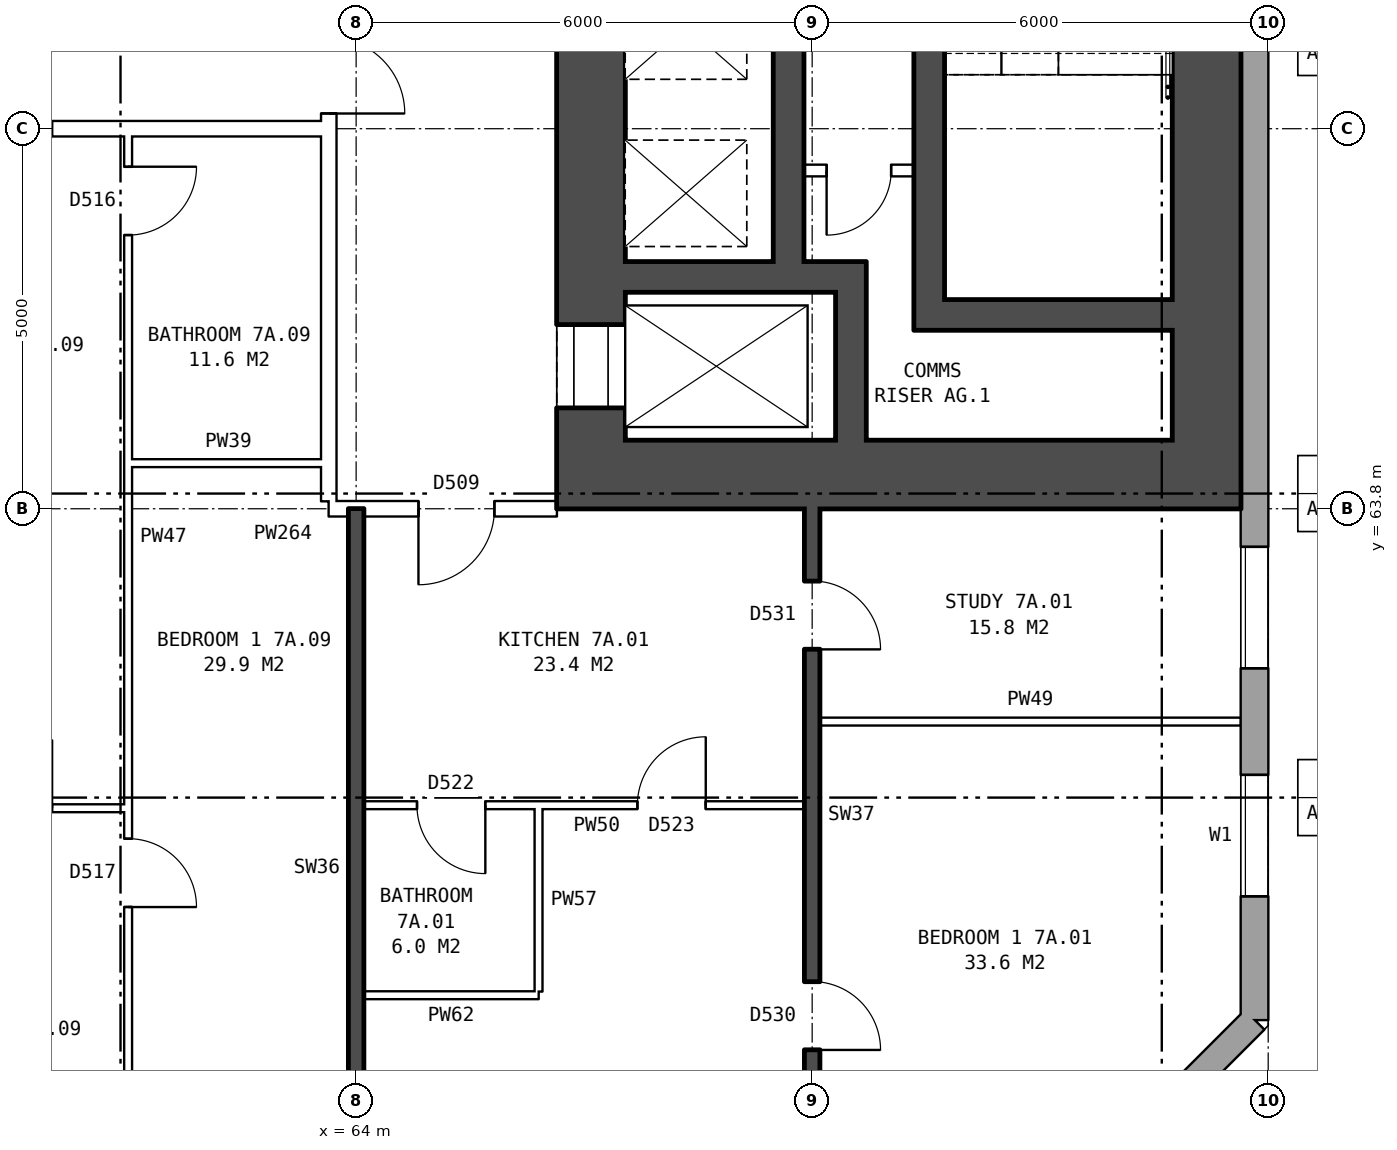
"""IFC4 building model, lengths in metres.
Left out: names, types, materials, properties, quantities, classifications, styles, units other than length and angle.
Written with IfcOpenShell. Run it as: python <this file> out.ifc"""

import sys

from ifc_helpers import new_model, si_unit, direction, frame, frame_2d, origin, place, context, subcontext, project, spatial, rectangle, extrude, element, fill, save


model = new_model("IFC4")
c1 = context("Model", 3, precision=1e-05, world=origin(), true_north=direction((0.0, 1.0)))
c2 = subcontext(c1, "Body", "Model", "MODEL_VIEW")
j1 = project(units=[si_unit("LENGTHUNIT", "METRE"), si_unit("PLANEANGLEUNIT", "RADIAN")], contexts=[c1])
p1 = place(None, origin())
s1 = spatial("IfcSite", under=j1, at=p1, CompositionType="ELEMENT")
p2 = place(p1, origin())
s2 = spatial("IfcBuilding", under=s1, at=p2, CompositionType="ELEMENT")
p3 = place(p2, frame((0.0, 0.0, 28.8)))
s3 = spatial("IfcBuildingStorey", under=s2, at=p3, CompositionType="ELEMENT", Elevation=28.8)
p4 = place(p3, frame((72.925, 54.18, 0.0), z_axis=(0.0, 0.0, 1.0), x_axis=(0.707106781187, 0.707106781187, 0.0)))
e1 = element("IfcWall", 1, at=p4, inside=s3, PredefinedType="STANDARD", context=c2, shape_type="SweptSolid", body=[
    extrude(rectangle(XDim=4.094, YDim=0.36, at=frame_2d((2.047, 0.0))), origin(), (0.0, 0.0, 1.0), 2.85),
])
p5 = place(p4, frame((1.247, 0.0, 0.8)))
e2 = element("IfcOpeningElement", 2, at=p5, cuts=e1, PredefinedType="OPENING", context=c2, shape_type="SweptSolid", body=[
    extrude(rectangle(XDim=1.6, YDim=1.8, at=frame_2d((0.8, 0.9))), frame((0.0, 0.19, 0.0), z_axis=(0.0, -1.0, 0.0), x_axis=(1.0, 0.0, 0.0)), (0.0, 0.0, 1.0), 0.38),
])
p6 = place(p3, frame((75.82, 57.075, 0.0), z_axis=(0.0, 0.0, 1.0), x_axis=(0.0, 1.0, 0.0)))
e3 = element("IfcWall", 3, at=p6, inside=s3, PredefinedType="STANDARD", context=c2, shape_type="SweptSolid", body=[
    extrude(rectangle(XDim=25.851, YDim=0.36, at=frame_2d((12.925, 0.0))), origin(), (0.0, 0.0, 1.0), 2.85),
])
p7 = place(p6, frame((1.625, 0.0, 0.8)))
e4 = element("IfcOpeningElement", 4, at=p7, cuts=e3, PredefinedType="OPENING", context=c2, shape_type="SweptSolid", body=[
    extrude(rectangle(XDim=1.6, YDim=1.8, at=frame_2d((0.8, 0.9))), frame((0.0, 0.19, 0.0), z_axis=(0.0, -1.0, 0.0), x_axis=(1.0, 0.0, 0.0)), (0.0, 0.0, 1.0), 0.38),
])
p8 = place(p6, frame((4.625, 0.0, 0.8)))
e5 = element("IfcOpeningElement", 5, at=p8, cuts=e3, PredefinedType="OPENING", context=c2, shape_type="SweptSolid", body=[
    extrude(rectangle(XDim=1.6, YDim=1.8, at=frame_2d((0.8, 0.9))), frame((0.0, 0.19, 0.0), z_axis=(0.0, -1.0, 0.0), x_axis=(1.0, 0.0, 0.0)), (0.0, 0.0, 1.0), 0.38),
])
p9 = place(p6, frame((19.625, 0.0, 0.8)))
e6 = element("IfcOpeningElement", 6, at=p9, cuts=e3, PredefinedType="OPENING", context=c2, shape_type="SweptSolid", body=[
    extrude(rectangle(XDim=1.6, YDim=1.8, at=frame_2d((0.8, 0.9))), frame((0.0, 0.19, 0.0), z_axis=(0.0, -1.0, 0.0), x_axis=(1.0, 0.0, 0.0)), (0.0, 0.0, 1.0), 0.38),
])
p10 = place(p6, frame((22.625, 0.0, 0.8)))
e7 = element("IfcOpeningElement", 7, at=p10, cuts=e3, PredefinedType="OPENING", context=c2, shape_type="SweptSolid", body=[
    extrude(rectangle(XDim=1.6, YDim=1.8, at=frame_2d((0.8, 0.9))), frame((0.0, 0.19, 0.0), z_axis=(0.0, -1.0, 0.0), x_axis=(1.0, 0.0, 0.0)), (0.0, 0.0, 1.0), 0.38),
])
p11 = place(p3, frame((67.09, 64.7, 0.0), z_axis=(0.0, 0.0, 1.0), x_axis=(0.0, 1.0, 0.0)))
e8 = element("IfcWall", 8, at=p11, inside=s3, PredefinedType="SHEAR", context=c2, shape_type="SweptSolid", body=[
    extrude(rectangle(XDim=10.6, YDim=0.9, at=frame_2d((5.3, 0.0))), origin(), (0.0, 0.0, 1.0), 2.85),
])
p12 = place(p11, frame((0.425, 0.0, 0.0)))
e9 = element("IfcOpeningElement", 9, at=p12, cuts=e8, PredefinedType="OPENING", context=c2, shape_type="SweptSolid", body=[
    extrude(rectangle(XDim=1.1, YDim=2.1, at=frame_2d((0.55, 1.05))), frame((0.0, 0.46, 0.0), z_axis=(0.0, -1.0, 0.0), x_axis=(1.0, 0.0, 0.0)), (0.0, 0.0, 1.0), 0.92),
])
p13 = place(p11, frame((9.0, 0.0, 0.0)))
e10 = element("IfcOpeningElement", 10, at=p13, cuts=e8, PredefinedType="OPENING", context=c2, shape_type="SweptSolid", body=[
    extrude(rectangle(XDim=1.1, YDim=2.1, at=frame_2d((0.55, 1.05))), frame((0.0, 0.46, 0.0), z_axis=(0.0, -1.0, 0.0), x_axis=(1.0, 0.0, 0.0)), (0.0, 0.0, 1.0), 0.92),
])
p14 = place(p3, frame((75.19, 64.7, 0.0), z_axis=(0.0, 0.0, 1.0), x_axis=(0.0, 1.0, 0.0)))
e11 = element("IfcWall", 11, at=p14, inside=s3, PredefinedType="SHEAR", context=c2, shape_type="SweptSolid", body=[
    extrude(rectangle(XDim=10.6, YDim=0.9, at=frame_2d((5.3, 0.0))), origin(), (0.0, 0.0, 1.0), 2.85),
])
p15 = place(p3, frame((66.64, 64.25, 0.0), z_axis=(0.0, 0.0, 1.0), x_axis=(1.0, 0.0, 0.0)))
e12 = element("IfcWall", 12, at=p15, inside=s3, PredefinedType="SHEAR", context=c2, shape_type="SweptSolid", body=[
    extrude(rectangle(XDim=9.0, YDim=0.9, at=frame_2d((4.5, 0.0))), origin(), (0.0, 0.0, 1.0), 2.85),
])
p16 = place(p3, frame((71.74, 66.35, 0.0), z_axis=(0.0, 0.0, 1.0), x_axis=(1.0, 0.0, 0.0)))
e13 = element("IfcWall", 13, at=p16, inside=s3, PredefinedType="SHEAR", context=c2, shape_type="SweptSolid", body=[
    extrude(rectangle(XDim=3.0, YDim=0.4, at=frame_2d((1.5, 0.0))), origin(), (0.0, 0.0, 1.0), 2.85),
])
p17 = place(p3, frame((67.54, 66.85, 0.0), z_axis=(0.0, 0.0, 1.0), x_axis=(1.0, 0.0, 0.0)))
e14 = element("IfcWall", 14, at=p17, inside=s3, PredefinedType="SHEAR", context=c2, shape_type="SweptSolid", body=[
    extrude(rectangle(XDim=3.17, YDim=0.4, at=frame_2d((1.585, 0.0))), origin(), (0.0, 0.0, 1.0), 2.85),
])
p18 = place(p3, frame((69.89, 68.25, 0.0), z_axis=(0.0, 0.0, 1.0), x_axis=(1.0, 0.0, 0.0)))
e15 = element("IfcWall", 15, at=p18, inside=s3, PredefinedType="PARTITIONING", context=c2, shape_type="SweptSolid", body=[
    extrude(rectangle(XDim=1.45, YDim=0.15, at=frame_2d((0.725, 0.0))), origin(), (0.0, 0.0, 1.0), 2.85),
])
p19 = place(p18, frame((0.3, 0.0, 0.0)))
e16 = element("IfcOpeningElement", 16, at=p19, cuts=e15, PredefinedType="OPENING", context=c2, shape_type="SweptSolid", body=[
    extrude(rectangle(XDim=0.85, YDim=2.1, at=frame_2d((0.425, 1.05))), frame((0.0, 0.085, 0.0), z_axis=(0.0, -1.0, 0.0), x_axis=(1.0, 0.0, 0.0)), (0.0, 0.0, 1.0), 0.17),
])
p20 = place(p3, frame((69.69, 67.05, 0.0), z_axis=(0.0, 0.0, 1.0), x_axis=(0.0, 1.0, 0.0)))
e17 = element("IfcWall", 17, at=p20, inside=s3, PredefinedType="SHEAR", context=c2, shape_type="SweptSolid", body=[
    extrude(rectangle(XDim=6.6, YDim=0.4, at=frame_2d((3.3, 0.0))), origin(), (0.0, 0.0, 1.0), 2.85),
])
p21 = place(p3, frame((70.51, 64.7, 0.0), z_axis=(0.0, 0.0, 1.0), x_axis=(0.0, 1.0, 0.0)))
e18 = element("IfcWall", 18, at=p21, inside=s3, PredefinedType="SHEAR", context=c2, shape_type="SweptSolid", body=[
    extrude(rectangle(XDim=1.95, YDim=0.4, at=frame_2d((0.975, 0.0))), origin(), (0.0, 0.0, 1.0), 2.85),
])
p22 = place(p3, frame((71.54, 66.15, 0.0), z_axis=(0.0, 0.0, 1.0), x_axis=(0.0, 1.0, 0.0)))
e19 = element("IfcWall", 19, at=p22, inside=s3, PredefinedType="SHEAR", context=c2, shape_type="SweptSolid", body=[
    extrude(rectangle(XDim=7.3, YDim=0.4, at=frame_2d((3.65, 0.0))), origin(), (0.0, 0.0, 1.0), 2.85),
])
p23 = place(p22, frame((5.8, 0.0, 0.0)))
e20 = element("IfcOpeningElement", 20, at=p23, cuts=e19, PredefinedType="OPENING", context=c2, shape_type="SweptSolid", body=[
    extrude(rectangle(XDim=1.1, YDim=2.1, at=frame_2d((0.55, 1.05))), frame((0.0, 0.21, 0.0), z_axis=(0.0, -1.0, 0.0), x_axis=(1.0, 0.0, 0.0)), (0.0, 0.0, 1.0), 0.42),
])
p24 = place(p3, frame((63.64, 63.9, 0.0), z_axis=(0.0, 0.0, 1.0), x_axis=(0.0, 1.0, 0.0)))
e21 = element("IfcWall", 21, at=p24, inside=s3, PredefinedType="PARTITIONING", context=c2, shape_type="SweptSolid", body=[
    extrude(rectangle(XDim=12.2, YDim=0.2, at=frame_2d((6.1, 0.0))), origin(), (0.0, 0.0, 1.0), 2.85),
])
p25 = place(p24, frame((5.1, 0.0, 0.0)))
e22 = element("IfcOpeningElement", 22, at=p25, cuts=e21, PredefinedType="OPENING", context=c2, shape_type="SweptSolid", body=[
    extrude(rectangle(XDim=2.0, YDim=2.1, at=frame_2d((1.0, 1.05))), frame((0.0, 0.11, 0.0), z_axis=(0.0, -1.0, 0.0), x_axis=(1.0, 0.0, 0.0)), (0.0, 0.0, 1.0), 0.22),
])
p26 = place(p3, frame((64.1, 57.4, 0.0), z_axis=(0.0, 0.0, 1.0), x_axis=(1.0, 0.0, 0.0)))
e23 = element("IfcWall", 23, at=p26, inside=s3, PredefinedType="PARTITIONING", context=c2, shape_type="SweptSolid", body=[
    extrude(rectangle(XDim=2.3, YDim=0.1, at=frame_2d((1.15, 0.0))), origin(), (0.0, 0.0, 1.0), 2.85),
])
p27 = place(p3, frame((58.1, 59.86, 0.0), z_axis=(0.0, 0.0, 1.0), x_axis=(1.0, 0.0, 0.0)))
e24 = element("IfcWall", 24, at=p27, inside=s3, PredefinedType="PARTITIONING", context=c2, shape_type="SweptSolid", body=[
    extrude(rectangle(XDim=2.9, YDim=0.1, at=frame_2d((1.45, 0.0))), origin(), (0.0, 0.0, 1.0), 2.85),
])
p28 = place(p27, frame((1.0, 0.0, 0.0)))
e25 = element("IfcOpeningElement", 25, at=p28, cuts=e24, PredefinedType="OPENING", context=c2, shape_type="SweptSolid", body=[
    extrude(rectangle(XDim=0.9, YDim=2.1, at=frame_2d((0.45, 1.05))), frame((0.0, 0.06, 0.0), z_axis=(0.0, -1.0, 0.0), x_axis=(1.0, 0.0, 0.0)), (0.0, 0.0, 1.0), 0.12),
])
p29 = place(p3, frame((64.1, 59.9, 0.0), z_axis=(0.0, 0.0, 1.0), x_axis=(1.0, 0.0, 0.0)))
e26 = element("IfcWall", 26, at=p29, inside=s3, PredefinedType="PARTITIONING", context=c2, shape_type="SweptSolid", body=[
    extrude(rectangle(XDim=5.8, YDim=0.1, at=frame_2d((2.9, 0.0))), origin(), (0.0, 0.0, 1.0), 2.85),
])
p30 = place(p29, frame((3.6, 0.0, 0.0)))
e27 = element("IfcOpeningElement", 27, at=p30, cuts=e26, PredefinedType="OPENING", context=c2, shape_type="SweptSolid", body=[
    extrude(rectangle(XDim=0.9, YDim=2.1, at=frame_2d((0.45, 1.05))), frame((0.0, 0.06, 0.0), z_axis=(0.0, -1.0, 0.0), x_axis=(1.0, 0.0, 0.0)), (0.0, 0.0, 1.0), 0.12),
])
p31 = place(p29, frame((0.7, 0.0, 0.0)))
e28 = element("IfcOpeningElement", 28, at=p31, cuts=e26, PredefinedType="OPENING", context=c2, shape_type="SweptSolid", body=[
    extrude(rectangle(XDim=0.9, YDim=2.1, at=frame_2d((0.45, 1.05))), frame((0.0, 0.06, 0.0), z_axis=(0.0, -1.0, 0.0), x_axis=(1.0, 0.0, 0.0)), (0.0, 0.0, 1.0), 0.12),
])
p32 = place(p3, frame((70.1, 61.0, 0.0), z_axis=(0.0, 0.0, 1.0), x_axis=(1.0, 0.0, 0.0)))
e29 = element("IfcWall", 29, at=p32, inside=s3, PredefinedType="PARTITIONING", context=c2, shape_type="SweptSolid", body=[
    extrude(rectangle(XDim=5.54, YDim=0.1, at=frame_2d((2.77, 0.0))), origin(), (0.0, 0.0, 1.0), 2.85),
])
p33 = place(p3, frame((63.64, 63.8, 0.0), z_axis=(0.0, 0.0, 1.0), x_axis=(1.0, 0.0, 0.0)))
e30 = element("IfcWall", 30, at=p33, inside=s3, PredefinedType="PARTITIONING", context=c2, shape_type="SweptSolid", body=[
    extrude(rectangle(XDim=3.0, YDim=0.2, at=frame_2d((1.5, 0.0))), origin(), (0.0, 0.0, 1.0), 2.85),
])
p34 = place(p33, frame((1.18, 0.0, 0.0)))
e31 = element("IfcOpeningElement", 31, at=p34, cuts=e30, PredefinedType="OPENING", context=c2, shape_type="SweptSolid", body=[
    extrude(rectangle(XDim=1.0, YDim=2.1, at=frame_2d((0.5, 1.05))), frame((0.0, 0.11, 0.0), z_axis=(0.0, -1.0, 0.0), x_axis=(1.0, 0.0, 0.0)), (0.0, 0.0, 1.0), 0.22),
])
p35 = place(p3, frame((61.0, 64.4, 0.0), z_axis=(0.0, 0.0, 1.0), x_axis=(1.0, 0.0, 0.0)))
e32 = element("IfcWall", 32, at=p35, inside=s3, PredefinedType="PARTITIONING", context=c2, shape_type="SweptSolid", body=[
    extrude(rectangle(XDim=2.64, YDim=0.1, at=frame_2d((1.32, 0.0))), origin(), (0.0, 0.0, 1.0), 2.85),
])
p36 = place(p3, frame((44.36, 68.8, 0.0), z_axis=(0.0, 0.0, 1.0), x_axis=(1.0, 0.0, 0.0)))
e33 = element("IfcWall", 33, at=p36, inside=s3, PredefinedType="PARTITIONING", context=c2, shape_type="SweptSolid", body=[
    extrude(rectangle(XDim=19.28, YDim=0.2, at=frame_2d((9.64, 0.0))), origin(), (0.0, 0.0, 1.0), 2.85),
])
p37 = place(p36, frame((14.64, 0.0, 0.0)))
e34 = element("IfcOpeningElement", 34, at=p37, cuts=e33, PredefinedType="OPENING", context=c2, shape_type="SweptSolid", body=[
    extrude(rectangle(XDim=1.0, YDim=2.1, at=frame_2d((0.5, 1.05))), frame((0.0, 0.11, 0.0), z_axis=(0.0, -1.0, 0.0), x_axis=(1.0, 0.0, 0.0)), (0.0, 0.0, 1.0), 0.22),
])
p38 = place(p36, frame((5.64, 0.0, 0.0)))
e35 = element("IfcOpeningElement", 35, at=p38, cuts=e33, PredefinedType="OPENING", context=c2, shape_type="SweptSolid", body=[
    extrude(rectangle(XDim=1.0, YDim=2.1, at=frame_2d((0.5, 1.05))), frame((0.0, 0.11, 0.0), z_axis=(0.0, -1.0, 0.0), x_axis=(1.0, 0.0, 0.0)), (0.0, 0.0, 1.0), 0.22),
])
p39 = place(p3, frame((61.0, 54.36, 0.0), z_axis=(0.0, 0.0, 1.0), x_axis=(0.0, 1.0, 0.0)))
e36 = element("IfcWall", 36, at=p39, inside=s3, PredefinedType="PARTITIONING", context=c2, shape_type="SweptSolid", body=[
    extrude(rectangle(XDim=14.34, YDim=0.1, at=frame_2d((7.17, 0.0))), origin(), (0.0, 0.0, 1.0), 2.85),
])
p40 = place(p39, frame((4.2, 0.0, 0.0)))
e37 = element("IfcOpeningElement", 37, at=p40, cuts=e36, PredefinedType="OPENING", context=c2, shape_type="SweptSolid", body=[
    extrude(rectangle(XDim=0.9, YDim=2.1, at=frame_2d((0.45, 1.05))), frame((0.0, 0.06, 0.0), z_axis=(0.0, -1.0, 0.0), x_axis=(1.0, 0.0, 0.0)), (0.0, 0.0, 1.0), 0.12),
])
p41 = place(p39, frame((13.04, 0.0, 0.0)))
e38 = element("IfcOpeningElement", 38, at=p41, cuts=e36, PredefinedType="OPENING", context=c2, shape_type="SweptSolid", body=[
    extrude(rectangle(XDim=0.9, YDim=2.1, at=frame_2d((0.45, 1.05))), frame((0.0, 0.06, 0.0), z_axis=(0.0, -1.0, 0.0), x_axis=(1.0, 0.0, 0.0)), (0.0, 0.0, 1.0), 0.12),
])
p42 = place(p3, frame((64.0, 54.36, 0.0), z_axis=(0.0, 0.0, 1.0), x_axis=(0.0, 1.0, 0.0)))
e39 = element("IfcWall", 39, at=p42, inside=s3, PredefinedType="SOLIDWALL", context=c2, shape_type="SweptSolid", body=[
    extrude(rectangle(XDim=9.44, YDim=0.2, at=frame_2d((4.72, 0.0))), origin(), (0.0, 0.0, 1.0), 2.85),
])
p43 = place(p3, frame((66.4, 57.45, 0.0), z_axis=(0.0, 0.0, 1.0), x_axis=(0.0, 1.0, 0.0)))
e40 = element("IfcWall", 40, at=p43, inside=s3, PredefinedType="PARTITIONING", context=c2, shape_type="SweptSolid", body=[
    extrude(rectangle(XDim=2.4, YDim=0.1, at=frame_2d((1.2, 0.0))), origin(), (0.0, 0.0, 1.0), 2.85),
])
p44 = place(p3, frame((70.0, 54.36, 0.0), z_axis=(0.0, 0.0, 1.0), x_axis=(0.0, 1.0, 0.0)))
e41 = element("IfcWall", 41, at=p44, inside=s3, PredefinedType="SOLIDWALL", context=c2, shape_type="SweptSolid", body=[
    extrude(rectangle(XDim=9.44, YDim=0.2, at=frame_2d((4.72, 0.0))), origin(), (0.0, 0.0, 1.0), 2.85),
])
p45 = place(p44, frame((2.32, 0.0, 0.0)))
e42 = element("IfcOpeningElement", 42, at=p45, cuts=e41, PredefinedType="OPENING", context=c2, shape_type="SweptSolid", body=[
    extrude(rectangle(XDim=0.9, YDim=2.1, at=frame_2d((0.45, 1.05))), frame((0.0, 0.11, 0.0), z_axis=(0.0, -1.0, 0.0), x_axis=(1.0, 0.0, 0.0)), (0.0, 0.0, 1.0), 0.22),
])
p46 = place(p44, frame((7.59, 0.0, 0.0)))
e43 = element("IfcOpeningElement", 43, at=p46, cuts=e41, PredefinedType="OPENING", context=c2, shape_type="SweptSolid", body=[
    extrude(rectangle(XDim=0.9, YDim=2.1, at=frame_2d((0.45, 1.05))), frame((0.0, 0.11, 0.0), z_axis=(0.0, -1.0, 0.0), x_axis=(1.0, 0.0, 0.0)), (0.0, 0.0, 1.0), 0.22),
])
p47 = place(p7, origin())
e44 = element("IfcWindow", 44, at=p47, inside=s3, PartitioningType="SINGLE_PANEL", PredefinedType="WINDOW", context=c2, shape_type="SweptSolid", body=[
    extrude(rectangle(XDim=1.6, YDim=1.8, at=frame_2d((0.8, 0.9))), frame((0.0, 0.15, 0.0), z_axis=(0.0, -1.0, 0.0), x_axis=(1.0, 0.0, 0.0)), (0.0, 0.0, 1.0), 0.06),
])
fill(e4, e44)
p48 = place(p8, origin())
e45 = element("IfcWindow", 45, at=p48, inside=s3, PartitioningType="SINGLE_PANEL", PredefinedType="WINDOW", context=c2, shape_type="SweptSolid", body=[
    extrude(rectangle(XDim=1.6, YDim=1.8, at=frame_2d((0.8, 0.9))), frame((0.0, 0.15, 0.0), z_axis=(0.0, -1.0, 0.0), x_axis=(1.0, 0.0, 0.0)), (0.0, 0.0, 1.0), 0.06),
])
fill(e5, e45)
p49 = place(p12, origin())
e46 = element("IfcDoor", 46, at=p49, inside=s3, OperationType="DOUBLE_DOOR_SLIDING", PredefinedType="DOOR", context=c2, shape_type="SweptSolid", body=[
    extrude(rectangle(XDim=1.1, YDim=2.1, at=frame_2d((0.55, 1.05))), frame((0.0, -0.385, 0.0), z_axis=(0.0, -1.0, 0.0), x_axis=(1.0, 0.0, 0.0)), (0.0, 0.0, 1.0), 0.05),
])
fill(e9, e46)
p50 = place(p19, frame((0.85, 0.0, 0.0), z_axis=(0.0, 0.0, 1.0), x_axis=(-1.0, 0.0, 0.0)))
e47 = element("IfcDoor", 47, at=p50, inside=s3, OperationType="SINGLE_SWING_RIGHT", PredefinedType="DOOR", context=c2, shape_type="SweptSolid", body=[
    extrude(rectangle(XDim=0.85, YDim=2.1, at=frame_2d((0.425, 1.05))), frame((0.0, 0.025, 0.0), z_axis=(0.0, -1.0, 0.0), x_axis=(1.0, 0.0, 0.0)), (0.0, 0.0, 1.0), 0.05),
])
fill(e16, e47)
p51 = place(p25, frame((2.0, 0.0, 0.0), z_axis=(0.0, 0.0, 1.0), x_axis=(-1.0, 0.0, 0.0)))
e48 = element("IfcDoor", 48, at=p51, inside=s3, OperationType="DOUBLE_DOOR_SINGLE_SWING", PredefinedType="DOOR", context=c2, shape_type="SweptSolid", body=[
    extrude(rectangle(XDim=2.0, YDim=2.1, at=frame_2d((1.0, 1.05))), frame((0.0, 0.025, 0.0), z_axis=(0.0, -1.0, 0.0), x_axis=(1.0, 0.0, 0.0)), (0.0, 0.0, 1.0), 0.05),
])
fill(e22, e48)
p52 = place(p45, frame((0.9, 0.0, 0.0), z_axis=(0.0, 0.0, 1.0), x_axis=(-1.0, 0.0, 0.0)))
e49 = element("IfcDoor", 49, at=p52, inside=s3, OperationType="SINGLE_SWING_RIGHT", PredefinedType="DOOR", context=c2, shape_type="SweptSolid", body=[
    extrude(rectangle(XDim=0.9, YDim=2.1, at=frame_2d((0.45, 1.05))), frame((0.0, 0.025, 0.0), z_axis=(0.0, -1.0, 0.0), x_axis=(1.0, 0.0, 0.0)), (0.0, 0.0, 1.0), 0.05),
])
fill(e42, e49)
p53 = place(p46, frame((0.9, 0.0, 0.0), z_axis=(0.0, 0.0, 1.0), x_axis=(-1.0, 0.0, 0.0)))
e50 = element("IfcDoor", 50, at=p53, inside=s3, OperationType="SINGLE_SWING_RIGHT", PredefinedType="DOOR", context=c2, shape_type="SweptSolid", body=[
    extrude(rectangle(XDim=0.9, YDim=2.1, at=frame_2d((0.45, 1.05))), frame((0.0, 0.025, 0.0), z_axis=(0.0, -1.0, 0.0), x_axis=(1.0, 0.0, 0.0)), (0.0, 0.0, 1.0), 0.05),
])
fill(e43, e50)
p54 = place(p34, frame((1.0, 0.0, 0.0), z_axis=(0.0, 0.0, 1.0), x_axis=(-1.0, 0.0, 0.0)))
e51 = element("IfcDoor", 51, at=p54, inside=s3, OperationType="SINGLE_SWING_RIGHT", PredefinedType="DOOR", context=c2, shape_type="SweptSolid", body=[
    extrude(rectangle(XDim=1.0, YDim=2.1, at=frame_2d((0.5, 1.05))), frame((0.0, 0.025, 0.0), z_axis=(0.0, -1.0, 0.0), x_axis=(1.0, 0.0, 0.0)), (0.0, 0.0, 1.0), 0.05),
])
fill(e31, e51)
p55 = place(p30, origin())
e52 = element("IfcDoor", 52, at=p55, inside=s3, OperationType="SINGLE_SWING_RIGHT", PredefinedType="DOOR", context=c2, shape_type="SweptSolid", body=[
    extrude(rectangle(XDim=0.9, YDim=2.1, at=frame_2d((0.45, 1.05))), frame((0.0, 0.025, 0.0), z_axis=(0.0, -1.0, 0.0), x_axis=(1.0, 0.0, 0.0)), (0.0, 0.0, 1.0), 0.05),
])
fill(e27, e52)
p56 = place(p31, frame((0.9, 0.0, 0.0), z_axis=(0.0, 0.0, 1.0), x_axis=(-1.0, 0.0, 0.0)))
e53 = element("IfcDoor", 53, at=p56, inside=s3, OperationType="SINGLE_SWING_LEFT", PredefinedType="DOOR", context=c2, shape_type="SweptSolid", body=[
    extrude(rectangle(XDim=0.9, YDim=2.1, at=frame_2d((0.45, 1.05))), frame((0.0, 0.025, 0.0), z_axis=(0.0, -1.0, 0.0), x_axis=(1.0, 0.0, 0.0)), (0.0, 0.0, 1.0), 0.05),
])
fill(e28, e53)
p57 = place(p40, frame((0.9, 0.0, 0.0), z_axis=(0.0, 0.0, 1.0), x_axis=(-1.0, 0.0, 0.0)))
e54 = element("IfcDoor", 54, at=p57, inside=s3, OperationType="SINGLE_SWING_RIGHT", PredefinedType="DOOR", context=c2, shape_type="SweptSolid", body=[
    extrude(rectangle(XDim=0.9, YDim=2.1, at=frame_2d((0.45, 1.05))), frame((0.0, 0.025, 0.0), z_axis=(0.0, -1.0, 0.0), x_axis=(1.0, 0.0, 0.0)), (0.0, 0.0, 1.0), 0.05),
])
fill(e37, e54)
p58 = place(p41, frame((0.9, 0.0, 0.0), z_axis=(0.0, 0.0, 1.0), x_axis=(-1.0, 0.0, 0.0)))
e55 = element("IfcDoor", 55, at=p58, inside=s3, OperationType="SINGLE_SWING_LEFT", PredefinedType="DOOR", context=c2, shape_type="SweptSolid", body=[
    extrude(rectangle(XDim=0.9, YDim=2.1, at=frame_2d((0.45, 1.05))), frame((0.0, 0.025, 0.0), z_axis=(0.0, -1.0, 0.0), x_axis=(1.0, 0.0, 0.0)), (0.0, 0.0, 1.0), 0.05),
])
fill(e38, e55)
save(model, sys.argv[1])
